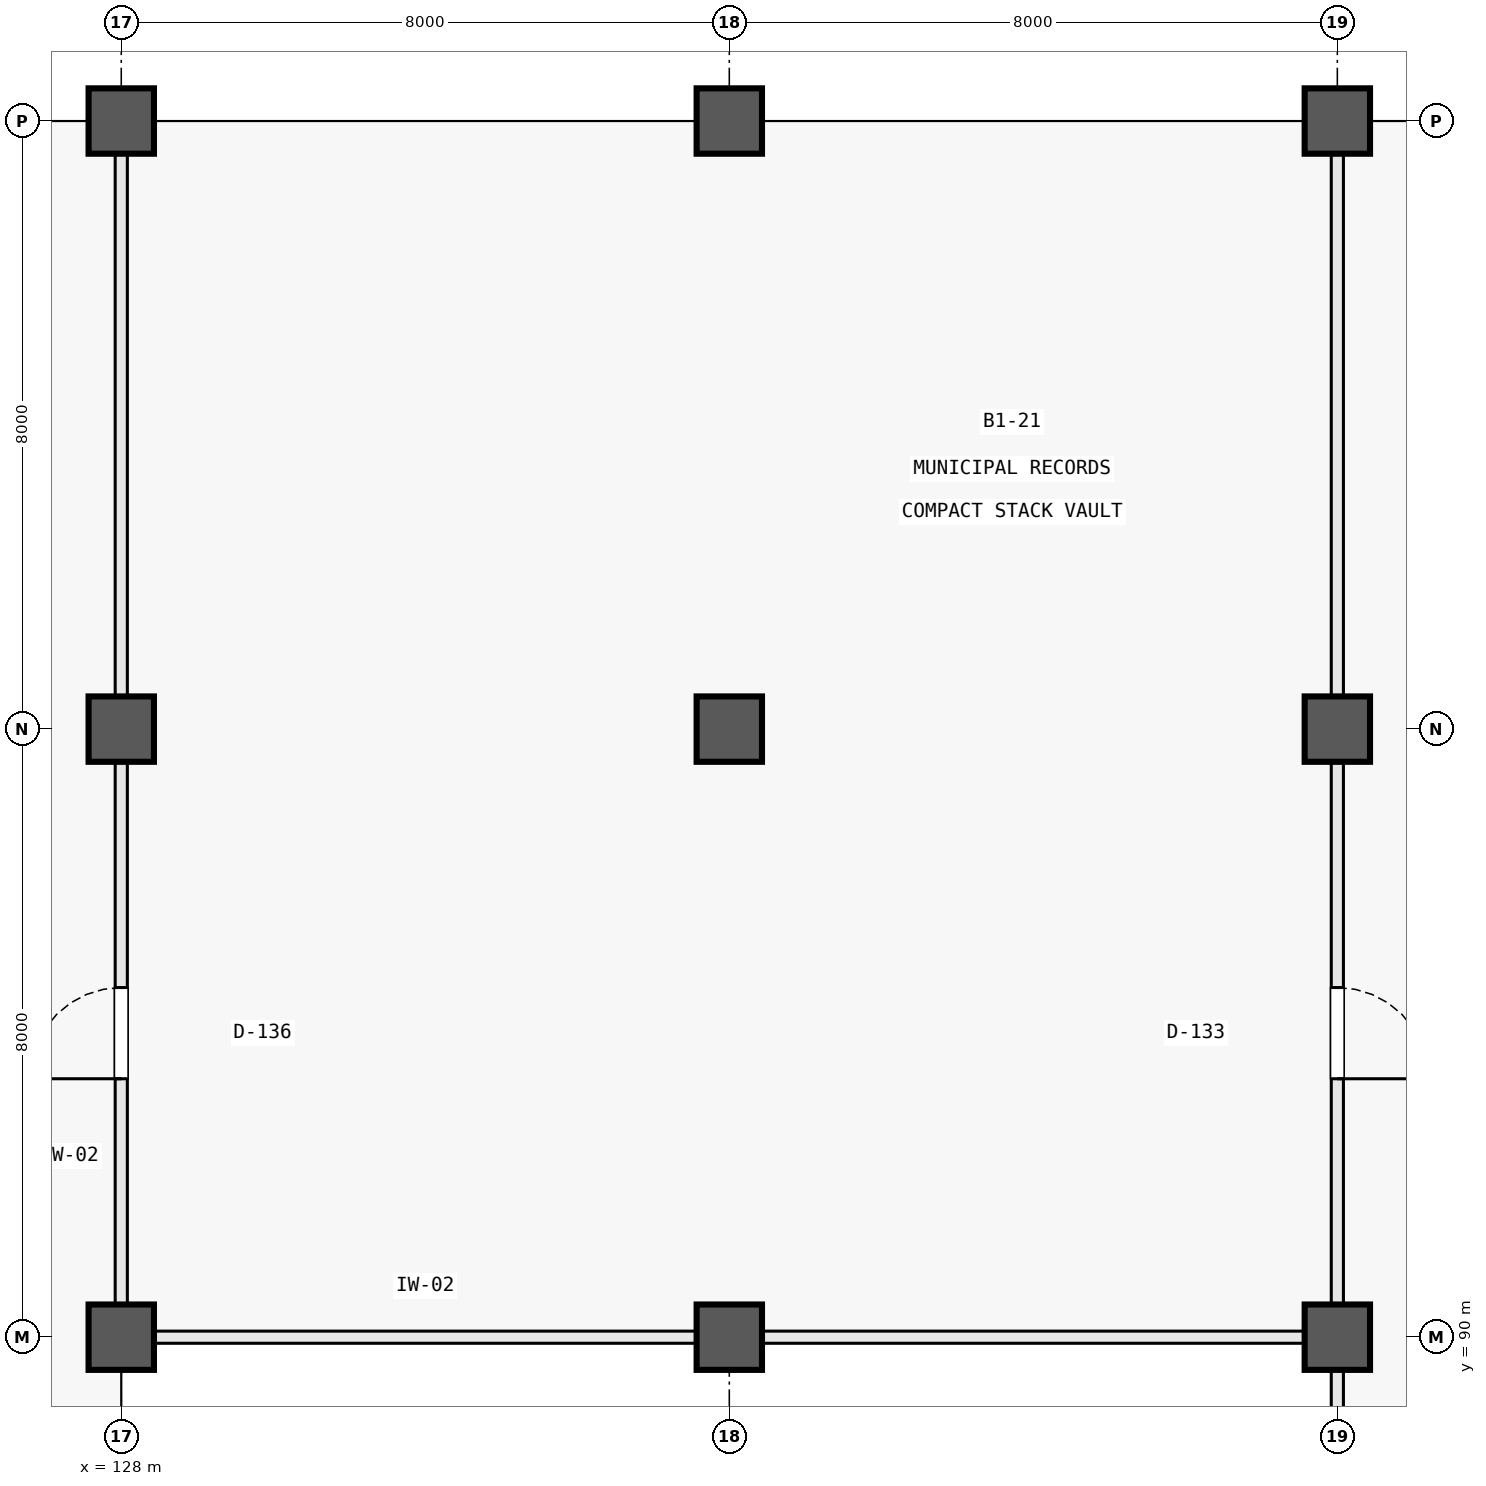
"""IFC4 building model, lengths in metres.
Left out: names, types, materials, properties, quantities, classifications, styles, units other than length and angle.
Written with IfcOpenShell. Run it as: python <this file> out.ifc"""

import sys

from ifc_helpers import new_model, si_unit, direction, frame, frame_2d, origin, origin_2d, place, context, subcontext, project, spatial, rectangle, extrude, element, fill, save


model = new_model("IFC4")
c1 = context("Model", 3, precision=1e-05, world=origin(), true_north=direction((0.0, 1.0)))
c2 = subcontext(c1, "Body", "Model", "MODEL_VIEW")
j1 = project(units=[si_unit("LENGTHUNIT", "METRE"), si_unit("PLANEANGLEUNIT", "RADIAN")], contexts=[c1])
p1 = place(None, origin())
s1 = spatial("IfcSite", under=j1, at=p1, CompositionType="ELEMENT")
p2 = place(p1, origin())
s2 = spatial("IfcBuilding", under=s1, at=p2, CompositionType="ELEMENT")
p3 = place(p2, frame((0.0, 0.0, -5.4)))
s3 = spatial("IfcBuildingStorey", under=s2, at=p3, CompositionType="ELEMENT", Elevation=-5.4)
for number, where, z_axis, x_axis in (
    (1, (128.0, 90.0, 0.0), (0.0, 0.0, 1.0), (1.0, 0.0, 0.0)),
    (2, (128.0, 98.0, 0.0), (0.0, 0.0, 1.0), (1.0, 0.0, 0.0)),
    (3, (128.0, 106.0, 0.0), (0.0, 0.0, 1.0), (1.0, 0.0, 0.0)),
    (4, (136.0, 90.0, 0.0), (0.0, 0.0, 1.0), (1.0, 0.0, 0.0)),
    (5, (136.0, 98.0, 0.0), (0.0, 0.0, 1.0), (1.0, 0.0, 0.0)),
    (6, (136.0, 106.0, 0.0), (0.0, 0.0, 1.0), (1.0, 0.0, 0.0)),
    (7, (144.0, 90.0, 0.0), (0.0, 0.0, 1.0), (1.0, 0.0, 0.0)),
    (8, (144.0, 98.0, 0.0), (0.0, 0.0, 1.0), (1.0, 0.0, 0.0)),
    (9, (144.0, 106.0, 0.0), (0.0, 0.0, 1.0), (1.0, 0.0, 0.0)),
):
    element("IfcColumn", number, at=place(p3, frame(where, z_axis=z_axis, x_axis=x_axis)), inside=s3, PredefinedType="COLUMN", context=c2, shape_type="SweptSolid", body=[
        extrude(rectangle(XDim=0.86, YDim=0.86, at=origin_2d()), origin(), (0.0, 0.0, 1.0), 5.4),
    ])
p4 = place(p3, frame((144.0, 82.44, 0.0), z_axis=(0.0, 0.0, 1.0), x_axis=(0.0, 1.0, 0.0)))
e10 = element("IfcWall", 10, at=p4, inside=s3, PredefinedType="PARTITIONING", context=c2, shape_type="SweptSolid", body=[
    extrude(rectangle(XDim=7.12, YDim=0.16, at=frame_2d((3.56, 0.0))), origin(), (0.0, 0.0, 1.0), 3.83),
])
p5 = place(p3, frame((144.0, 90.44, 0.0), z_axis=(0.0, 0.0, 1.0), x_axis=(0.0, 1.0, 0.0)))
e11 = element("IfcWall", 11, at=p5, inside=s3, PredefinedType="PARTITIONING", context=c2, shape_type="SweptSolid", body=[
    extrude(rectangle(XDim=7.12, YDim=0.16, at=frame_2d((3.56, 0.0))), origin(), (0.0, 0.0, 1.0), 3.83),
])
p6 = place(p5, frame((2.96, 0.0, 0.0)))
e12 = element("IfcOpeningElement", 12, at=p6, cuts=e11, PredefinedType="OPENING", context=c2, shape_type="SweptSolid", body=[
    extrude(rectangle(XDim=1.2, YDim=2.25, at=frame_2d((0.6, 1.125))), frame((0.0, 0.092, 0.0), z_axis=(0.0, -1.0, 0.0), x_axis=(1.0, 0.0, 0.0)), (0.0, 0.0, 1.0), 0.184),
])
for number, where, z_axis, x_axis in (
    (13, (144.0, 98.44, 0.0), (0.0, 0.0, 1.0), (0.0, 1.0, 0.0)),
    (14, (128.44, 90.0, 0.0), (0.0, 0.0, 1.0), (1.0, 0.0, 0.0)),
    (15, (136.44, 90.0, 0.0), (0.0, 0.0, 1.0), (1.0, 0.0, 0.0)),
):
    element("IfcWall", number, at=place(p3, frame(where, z_axis=z_axis, x_axis=x_axis)), inside=s3, PredefinedType="PARTITIONING", context=c2, shape_type="SweptSolid", body=[
        extrude(rectangle(XDim=7.12, YDim=0.16, at=frame_2d((3.56, 0.0))), origin(), (0.0, 0.0, 1.0), 3.83),
    ])
p7 = place(p3, frame((128.0, 90.44, 0.0), z_axis=(0.0, 0.0, 1.0), x_axis=(0.0, 1.0, 0.0)))
e16 = element("IfcWall", 16, at=p7, inside=s3, PredefinedType="PARTITIONING", context=c2, shape_type="SweptSolid", body=[
    extrude(rectangle(XDim=7.12, YDim=0.16, at=frame_2d((3.56, 0.0))), origin(), (0.0, 0.0, 1.0), 3.83),
])
p8 = place(p7, frame((2.96, 0.0, 0.0)))
e17 = element("IfcOpeningElement", 17, at=p8, cuts=e16, PredefinedType="OPENING", context=c2, shape_type="SweptSolid", body=[
    extrude(rectangle(XDim=1.2, YDim=2.25, at=frame_2d((0.6, 1.125))), frame((0.0, 0.092, 0.0), z_axis=(0.0, -1.0, 0.0), x_axis=(1.0, 0.0, 0.0)), (0.0, 0.0, 1.0), 0.184),
])
p9 = place(p3, frame((128.0, 98.44, 0.0), z_axis=(0.0, 0.0, 1.0), x_axis=(0.0, 1.0, 0.0)))
e18 = element("IfcWall", 18, at=p9, inside=s3, PredefinedType="PARTITIONING", context=c2, shape_type="SweptSolid", body=[
    extrude(rectangle(XDim=7.12, YDim=0.16, at=frame_2d((3.56, 0.0))), origin(), (0.0, 0.0, 1.0), 3.83),
])
p10 = place(p6, frame((1.2, 0.0, 0.0), z_axis=(0.0, 0.0, 1.0), x_axis=(-1.0, 0.0, 0.0)))
e19 = element("IfcDoor", 19, at=p10, inside=s3, OperationType="SINGLE_SWING_LEFT", PredefinedType="DOOR", context=c2, shape_type="SweptSolid", body=[
    extrude(rectangle(XDim=1.2, YDim=2.25, at=frame_2d((0.6, 1.125))), frame((0.0, 0.025, 0.0), z_axis=(0.0, -1.0, 0.0), x_axis=(1.0, 0.0, 0.0)), (0.0, 0.0, 1.0), 0.05),
])
fill(e12, e19)
p11 = place(p8, origin())
e20 = element("IfcDoor", 20, at=p11, inside=s3, OperationType="SINGLE_SWING_LEFT", PredefinedType="DOOR", context=c2, shape_type="SweptSolid", body=[
    extrude(rectangle(XDim=1.2, YDim=2.25, at=frame_2d((0.6, 1.125))), frame((0.0, 0.025, 0.0), z_axis=(0.0, -1.0, 0.0), x_axis=(1.0, 0.0, 0.0)), (0.0, 0.0, 1.0), 0.05),
])
fill(e17, e20)
save(model, sys.argv[1])
